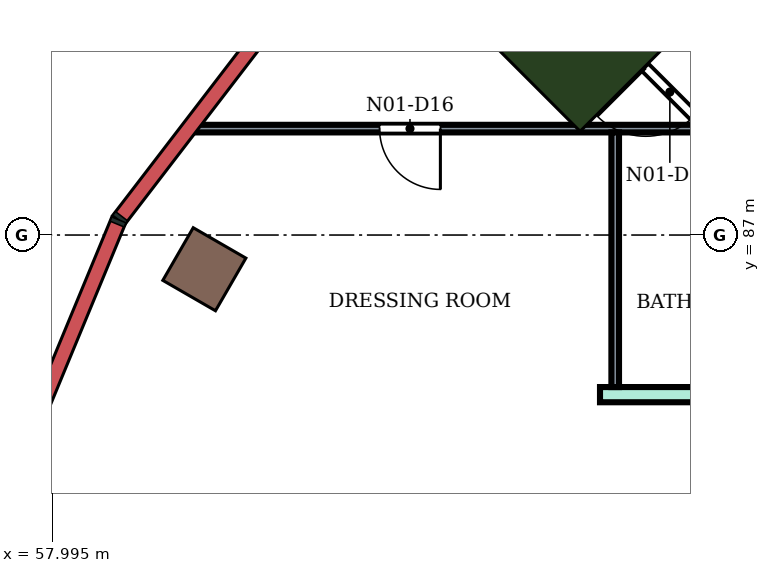
"""IFC4 building model, lengths in metres.
Left out: names, types, materials, properties, quantities, classifications, styles, units other than length and angle.
Written with IfcOpenShell. Run it as: python <this file> out.ifc"""

import sys

from ifc_helpers import new_model, si_unit, direction, frame, frame_2d, origin, origin_2d, place, context, subcontext, project, spatial, rectangle, extrude, element, fill, save


model = new_model("IFC4")
c1 = context("Model", 3, precision=1e-05, world=origin(), true_north=direction((0.0, 1.0)))
c2 = subcontext(c1, "Body", "Model", "MODEL_VIEW")
j1 = project(units=[si_unit("LENGTHUNIT", "METRE"), si_unit("PLANEANGLEUNIT", "RADIAN")], contexts=[c1])
p1 = place(None, origin())
s1 = spatial("IfcSite", under=j1, at=p1, CompositionType="ELEMENT")
p2 = place(p1, origin())
s2 = spatial("IfcBuilding", under=s1, at=p2, CompositionType="ELEMENT")
p3 = place(p2, frame((0.0, 0.0, 284.1)))
s3 = spatial("IfcBuildingStorey", under=s2, at=p3, CompositionType="ELEMENT", Elevation=284.1)
p4 = place(p3, frame((59.995, 86.55, 0.0), z_axis=(0.0, 0.0, 1.0), x_axis=(-0.866025403784, 0.5, 0.0)))
e1 = element("IfcColumn", 1, at=p4, inside=s3, PredefinedType="COLUMN", context=c2, shape_type="SweptSolid", body=[
    extrude(rectangle(XDim=0.8, YDim=0.8, at=origin_2d()), origin(), (0.0, 0.0, 1.0), 4.2),
])
p5 = place(p3, frame((65.151, 89.849, 0.0), z_axis=(0.0, 0.0, 1.0), x_axis=(-0.707106781187, 0.707106781187, 0.0)))
e2 = element("IfcColumn", 2, at=p5, inside=s3, PredefinedType="COLUMN", context=c2, shape_type="SweptSolid", body=[
    extrude(rectangle(XDim=1.8, YDim=2.4, at=origin_2d()), origin(), (0.0, 0.0, 1.0), 4.2),
])
p6 = place(p3, frame((65.2, 84.9, 0.0), z_axis=(0.0, 0.0, 1.0), x_axis=(1.0, 0.0, 0.0)))
e3 = element("IfcWall", 3, at=p6, inside=s3, PredefinedType="PARTITIONING", context=c2, shape_type="SweptSolid", body=[
    extrude(rectangle(XDim=2.97, YDim=0.2, at=frame_2d((1.485, 0.0))), origin(), (0.0, 0.0, 1.0), 3.75),
])
p7 = place(p3, frame((59.87, 88.4, 0.0), z_axis=(0.0, 0.0, 1.0), x_axis=(1.0, 0.0, 0.0)))
e4 = element("IfcWall", 4, at=p7, inside=s3, PredefinedType="PARTITIONING", context=c2, shape_type="SweptSolid", body=[
    extrude(rectangle(XDim=6.62, YDim=0.1, at=frame_2d((3.31, 0.0))), origin(), (0.0, 0.0, 1.0), 3.75),
])
p8 = place(p7, frame((2.43, 0.0, 0.0)))
e5 = element("IfcOpeningElement", 5, at=p8, cuts=e4, PredefinedType="OPENING", context=c2, shape_type="SweptSolid", body=[
    extrude(rectangle(XDim=0.8, YDim=2.1, at=frame_2d((0.4, 1.05))), frame((0.0, 0.06, 0.0), z_axis=(0.0, -1.0, 0.0), x_axis=(1.0, 0.0, 0.0)), (0.0, 0.0, 1.0), 0.12),
])
p9 = place(p3, frame((64.656, 90.344, 0.0), z_axis=(0.0, 0.0, 1.0), x_axis=(0.707106781187, -0.707106781187, 0.0)))
e6 = element("IfcWall", 6, at=p9, inside=s3, PredefinedType="PARTITIONING", context=c2, shape_type="SweptSolid", body=[
    extrude(rectangle(XDim=7.0, YDim=0.1, at=frame_2d((3.5, 0.0))), origin(), (0.0, 0.0, 1.0), 3.75),
])
p10 = place(p9, frame((1.619, 0.0, 0.0)))
e7 = element("IfcOpeningElement", 7, at=p10, cuts=e6, PredefinedType="OPENING", context=c2, shape_type="SweptSolid", body=[
    extrude(rectangle(XDim=0.9, YDim=2.1, at=frame_2d((0.45, 1.05))), frame((0.0, 0.06, 0.0), z_axis=(0.0, -1.0, 0.0), x_axis=(1.0, 0.0, 0.0)), (0.0, 0.0, 1.0), 0.12),
])
p11 = place(p9, frame((4.755, 0.0, 0.0)))
e8 = element("IfcOpeningElement", 8, at=p11, cuts=e6, PredefinedType="OPENING", context=c2, shape_type="SweptSolid", body=[
    extrude(rectangle(XDim=0.8, YDim=2.1, at=frame_2d((0.4, 1.05))), frame((0.0, 0.06, 0.0), z_axis=(0.0, -1.0, 0.0), x_axis=(1.0, 0.0, 0.0)), (0.0, 0.0, 1.0), 0.12),
])
p12 = place(p3, frame((65.4, 85.0, 0.0), z_axis=(0.0, 0.0, 1.0), x_axis=(0.0, 1.0, 0.0)))
e9 = element("IfcWall", 9, at=p12, inside=s3, PredefinedType="PARTITIONING", context=c2, shape_type="SweptSolid", body=[
    extrude(rectangle(XDim=3.35, YDim=0.1, at=frame_2d((1.675, 0.0))), origin(), (0.0, 0.0, 1.0), 3.75),
])
p13 = place(p10, frame((0.9, 0.0, 0.0), z_axis=(0.0, 0.0, 1.0), x_axis=(-1.0, 0.0, 0.0)))
e10 = element("IfcDoor", 10, at=p13, inside=s3, OperationType="SINGLE_SWING_RIGHT", PredefinedType="DOOR", context=c2, shape_type="SweptSolid", body=[
    extrude(rectangle(XDim=0.9, YDim=2.1, at=frame_2d((0.45, 1.05))), frame((0.0, 0.025, 0.0), z_axis=(0.0, -1.0, 0.0), x_axis=(1.0, 0.0, 0.0)), (0.0, 0.0, 1.0), 0.05),
])
fill(e7, e10)
p14 = place(p8, frame((0.8, 0.0, 0.0), z_axis=(0.0, 0.0, 1.0), x_axis=(-1.0, 0.0, 0.0)))
e11 = element("IfcDoor", 11, at=p14, inside=s3, OperationType="SINGLE_SWING_LEFT", PredefinedType="DOOR", context=c2, shape_type="SweptSolid", body=[
    extrude(rectangle(XDim=0.8, YDim=2.1, at=frame_2d((0.4, 1.05))), frame((0.0, 0.025, 0.0), z_axis=(0.0, -1.0, 0.0), x_axis=(1.0, 0.0, 0.0)), (0.0, 0.0, 1.0), 0.05),
])
fill(e5, e11)
save(model, sys.argv[1])
